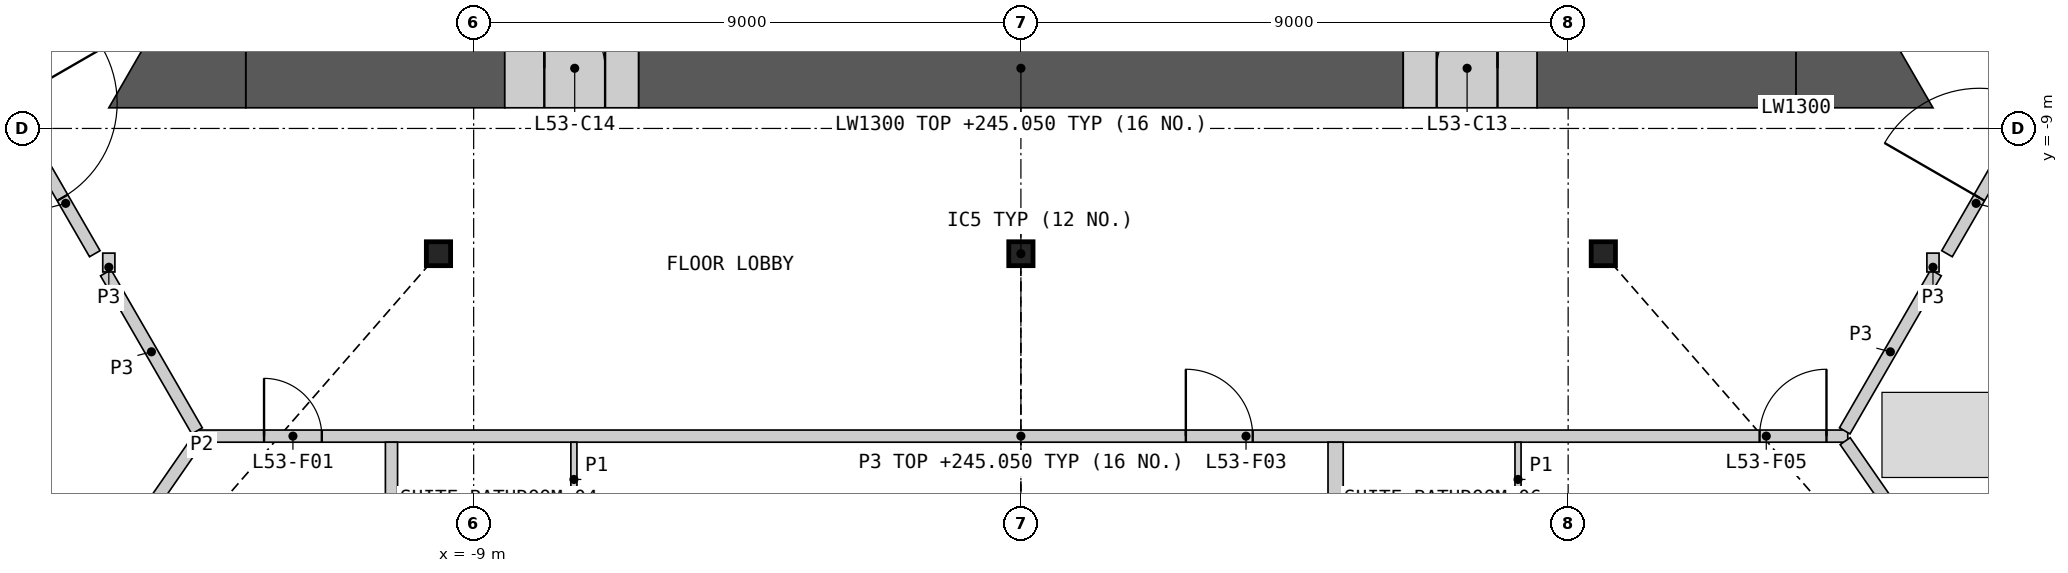
"""IFC4 building model, lengths in metres.
Left out: names, types, materials, properties, quantities, classifications, styles, units other than length and angle.
Written with IfcOpenShell. Run it as: python <this file> out.ifc"""

import sys

from ifc_helpers import new_model, si_unit, direction, frame, frame_2d, origin, origin_2d, place, context, subcontext, project, spatial, polyline, rectangle, i_section, outline, extrude, element, fill, save


model = new_model("IFC4")
c1 = context("Model", 3, precision=1e-05, world=origin(), true_north=direction((0.0, 1.0)))
c2 = subcontext(c1, "Body", "Model", "MODEL_VIEW")
j1 = project(units=[si_unit("LENGTHUNIT", "METRE"), si_unit("PLANEANGLEUNIT", "RADIAN")], contexts=[c1])
p1 = place(None, origin())
s1 = spatial("IfcSite", under=j1, at=p1, CompositionType="ELEMENT")
p2 = place(p1, origin())
s2 = spatial("IfcBuilding", under=s1, at=p2, CompositionType="ELEMENT")
p3 = place(p2, frame((0.0, 0.0, 241.8)))
s3 = spatial("IfcBuildingStorey", under=s2, at=p3, CompositionType="ELEMENT", Elevation=241.8)
for number, where, z_axis, x_axis in (
    (1, (-9.578, -11.06, 0.0), (0.0, 0.0, 1.0), (1.0, 0.0, 0.0)),
    (2, (0.0, -11.06, 0.0), (0.0, 0.0, 1.0), (1.0, 0.0, 0.0)),
    (3, (9.578, -11.06, 0.0), (0.0, 0.0, 1.0), (1.0, 0.0, 0.0)),
):
    element("IfcColumn", number, at=place(p3, frame(where, z_axis=z_axis, x_axis=x_axis)), inside=s3, PredefinedType="COLUMN", context=c2, shape_type="SweptSolid", body=[
        extrude(i_section(OverallWidth=0.399, OverallDepth=0.393, WebThickness=0.023, FlangeThickness=0.037, at=origin_2d()), origin(), (0.0, 0.0, 1.0), 3.6),
    ])
p4 = place(p3, frame((-6.288, -8.01, 0.0), z_axis=(0.0, 0.0, 1.0), x_axis=(1.0, 0.0, 0.0)))
e4 = element("IfcWall", 4, at=p4, inside=s3, PredefinedType="SHEAR", context=c2, shape_type="SweptSolid", body=[
    extrude(rectangle(XDim=12.576, YDim=1.3, at=frame_2d((6.288, 0.0))), origin(), (0.0, 0.0, 1.0), 3.25),
])
for number, where, z_axis, x_axis in (
    (5, (8.488, -8.01, 0.0), (0.0, 0.0, 1.0), (1.0, 0.0, 0.0)),
    (6, (-12.748, -8.01, 0.0), (0.0, 0.0, 1.0), (1.0, 0.0, 0.0)),
):
    element("IfcWall", number, at=place(p3, frame(where, z_axis=z_axis, x_axis=x_axis)), inside=s3, PredefinedType="SHEAR", context=c2, shape_type="SweptSolid", body=[
        extrude(rectangle(XDim=4.26, YDim=1.3, at=frame_2d((2.13, 0.0))), origin(), (0.0, 0.0, 1.0), 3.25),
    ])
p5 = place(p3, origin())
e7 = element("IfcWall", 7, at=p5, inside=s3, PredefinedType="SHEAR", context=c2, shape_type="SweptSolid", body=[
    extrude(outline(polyline([(12.748, -8.66), (12.748, -7.36), (13.874, -6.71), (15.0, -8.66), (12.748, -8.66)])), origin(), (0.0, 0.0, 1.0), 3.25),
])
p6 = place(p3, origin())
e8 = element("IfcWall", 8, at=p6, inside=s3, PredefinedType="SHEAR", context=c2, shape_type="SweptSolid", body=[
    extrude(outline(polyline([(-13.874, -6.71), (-12.748, -7.36), (-12.748, -8.66), (-15.0, -8.66), (-13.874, -6.71)])), origin(), (0.0, 0.0, 1.0), 3.25),
])
p7 = place(p3, frame((6.288, -8.01, 0.0), z_axis=(0.0, 0.0, 1.0), x_axis=(1.0, 0.0, 0.0)))
e9 = element("IfcWall", 9, at=p7, inside=s3, PredefinedType="SHEAR", context=c2, shape_type="SweptSolid", body=[
    extrude(rectangle(XDim=2.2, YDim=1.3, at=frame_2d((1.1, 0.0))), origin(), (0.0, 0.0, 1.0), 3.25),
])
p8 = place(p7, frame((0.55, 0.0, 0.0)))
e10 = element("IfcOpeningElement", 10, at=p8, cuts=e9, PredefinedType="OPENING", context=c2, shape_type="SweptSolid", body=[
    extrude(rectangle(XDim=1.0, YDim=2.1, at=frame_2d((0.5, 1.05))), frame((0.0, 0.66, 0.0), z_axis=(0.0, -1.0, 0.0), x_axis=(1.0, 0.0, 0.0)), (0.0, 0.0, 1.0), 1.32),
])
p9 = place(p3, frame((-8.488, -8.01, 0.0), z_axis=(0.0, 0.0, 1.0), x_axis=(1.0, 0.0, 0.0)))
e11 = element("IfcWall", 11, at=p9, inside=s3, PredefinedType="SHEAR", context=c2, shape_type="SweptSolid", body=[
    extrude(rectangle(XDim=2.2, YDim=1.3, at=frame_2d((1.1, 0.0))), origin(), (0.0, 0.0, 1.0), 3.25),
])
p10 = place(p9, frame((0.65, 0.0, 0.0)))
e12 = element("IfcOpeningElement", 12, at=p10, cuts=e11, PredefinedType="OPENING", context=c2, shape_type="SweptSolid", body=[
    extrude(rectangle(XDim=1.0, YDim=2.1, at=frame_2d((0.5, 1.05))), frame((0.0, 0.66, 0.0), z_axis=(0.0, -1.0, 0.0), x_axis=(1.0, 0.0, 0.0)), (0.0, 0.0, 1.0), 1.32),
])
p11 = place(p3, frame((-13.599, -14.06, 0.0), z_axis=(0.0, 0.0, 1.0), x_axis=(1.0, 0.0, 0.0)))
e13 = element("IfcWall", 13, at=p11, inside=s3, PredefinedType="PARTITIONING", context=c2, shape_type="SweptSolid", body=[
    extrude(rectangle(XDim=27.198, YDim=0.2, at=frame_2d((13.599, 0.0))), origin(), (0.0, 0.0, 1.0), 3.25),
])
p12 = place(p11, frame((1.152, 0.0, 0.0)))
e14 = element("IfcOpeningElement", 14, at=p12, cuts=e13, PredefinedType="OPENING", context=c2, shape_type="SweptSolid", body=[
    extrude(rectangle(XDim=0.95, YDim=2.1, at=frame_2d((0.475, 1.05))), frame((0.0, 0.11, 0.0), z_axis=(0.0, -1.0, 0.0), x_axis=(1.0, 0.0, 0.0)), (0.0, 0.0, 1.0), 0.22),
])
p13 = place(p11, frame((16.311, 0.0, 0.0)))
e15 = element("IfcOpeningElement", 15, at=p13, cuts=e13, PredefinedType="OPENING", context=c2, shape_type="SweptSolid", body=[
    extrude(rectangle(XDim=1.1, YDim=2.1, at=frame_2d((0.55, 1.05))), frame((0.0, 0.11, 0.0), z_axis=(0.0, -1.0, 0.0), x_axis=(1.0, 0.0, 0.0)), (0.0, 0.0, 1.0), 0.22),
])
p14 = place(p11, frame((25.747, 0.0, 0.0)))
e16 = element("IfcOpeningElement", 16, at=p14, cuts=e13, PredefinedType="OPENING", context=c2, shape_type="SweptSolid", body=[
    extrude(rectangle(XDim=1.1, YDim=2.1, at=frame_2d((0.55, 1.05))), frame((0.0, 0.11, 0.0), z_axis=(0.0, -1.0, 0.0), x_axis=(1.0, 0.0, 0.0)), (0.0, 0.0, 1.0), 0.22),
])
p15 = place(p3, frame((-17.244, -7.747, 0.0), z_axis=(0.0, 0.0, 1.0), x_axis=(0.500017753321, 0.866015153657, 0.0)))
e17 = element("IfcWall", 17, at=p15, inside=s3, PredefinedType="PARTITIONING", context=c2, shape_type="SweptSolid", body=[
    extrude(rectangle(XDim=5.51, YDim=0.2, at=frame_2d((2.755, 0.0))), origin(), (0.0, 0.0, 1.0), 3.25),
])
p16 = place(p15, frame((0.401, 0.0, 0.0)))
e18 = element("IfcOpeningElement", 18, at=p16, cuts=e17, PredefinedType="OPENING", context=c2, shape_type="SweptSolid", body=[
    extrude(rectangle(XDim=1.1, YDim=2.1, at=frame_2d((0.55, 1.05))), frame((0.0, 0.11, 0.0), z_axis=(0.0, -1.0, 0.0), x_axis=(1.0, 0.0, 0.0)), (0.0, 0.0, 1.0), 0.22),
])
p17 = place(p3, frame((14.489, -2.975, 0.0), z_axis=(0.0, 0.0, 1.0), x_axis=(0.500017753321, -0.866015153657, 0.0)))
e19 = element("IfcWall", 19, at=p17, inside=s3, PredefinedType="PARTITIONING", context=c2, shape_type="SweptSolid", body=[
    extrude(rectangle(XDim=5.51, YDim=0.2, at=frame_2d((2.755, 0.0))), origin(), (0.0, 0.0, 1.0), 3.25),
])
p18 = place(p17, frame((4.06, 0.0, 0.0)))
e20 = element("IfcOpeningElement", 20, at=p18, cuts=e19, PredefinedType="OPENING", context=c2, shape_type="SweptSolid", body=[
    extrude(rectangle(XDim=1.1, YDim=2.1, at=frame_2d((0.55, 1.05))), frame((0.0, 0.11, 0.0), z_axis=(0.0, -1.0, 0.0), x_axis=(1.0, 0.0, 0.0)), (0.0, 0.0, 1.0), 0.22),
])
p19 = place(p3, frame((5.176, -18.855, 0.0), z_axis=(0.0, 0.0, 1.0), x_axis=(0.0, 1.0, 0.0)))
e21 = element("IfcWall", 21, at=p19, inside=s3, PredefinedType="PARTITIONING", context=c2, shape_type="SweptSolid", body=[
    extrude(rectangle(XDim=4.695, YDim=0.25, at=frame_2d((2.348, 0.0))), origin(), (0.0, 0.0, 1.0), 2.404),
])
p20 = place(p3, frame((15.231, -11.06, 0.0), z_axis=(0.0, 0.0, 1.0), x_axis=(0.499961815444, 0.866047448526, 0.0)))
e22 = element("IfcWall", 22, at=p20, inside=s3, PredefinedType="PARTITIONING", context=c2, shape_type="SweptSolid", body=[
    extrude(rectangle(XDim=3.826, YDim=0.2, at=frame_2d((1.913, 0.0))), origin(), (0.0, 0.0, 1.0), 3.25),
])
p21 = place(p20, frame((1.064, 0.0, 0.0)))
e23 = element("IfcOpeningElement", 23, at=p21, cuts=e22, PredefinedType="OPENING", context=c2, shape_type="SweptSolid", body=[
    extrude(rectangle(XDim=1.8, YDim=2.1, at=frame_2d((0.9, 1.05))), frame((0.0, 0.11, 0.0), z_axis=(0.0, -1.0, 0.0), x_axis=(1.0, 0.0, 0.0)), (0.0, 0.0, 1.0), 0.22),
])
p22 = place(p3, frame((-17.144, -7.747, 0.0), z_axis=(0.0, 0.0, 1.0), x_axis=(0.499961815444, -0.866047448526, 0.0)))
e24 = element("IfcWall", 24, at=p22, inside=s3, PredefinedType="PARTITIONING", context=c2, shape_type="SweptSolid", body=[
    extrude(rectangle(XDim=3.826, YDim=0.2, at=frame_2d((1.913, 0.0))), origin(), (0.0, 0.0, 1.0), 3.25),
])
p23 = place(p22, frame((0.962, 0.0, 0.0)))
e25 = element("IfcOpeningElement", 25, at=p23, cuts=e24, PredefinedType="OPENING", context=c2, shape_type="SweptSolid", body=[
    extrude(rectangle(XDim=1.8, YDim=2.1, at=frame_2d((0.9, 1.05))), frame((0.0, 0.11, 0.0), z_axis=(0.0, -1.0, 0.0), x_axis=(1.0, 0.0, 0.0)), (0.0, 0.0, 1.0), 0.22),
])
for number, where, z_axis, x_axis in (
    (26, (13.549, -13.974, 0.0), (0.0, 0.0, 1.0), (0.5, 0.866, 0.0)),
    (27, (-15.05, -11.374, 0.0), (0.0, 0.0, 1.0), (0.5, -0.866, 0.0)),
):
    element("IfcWall", number, at=place(p3, frame(where, z_axis=z_axis, x_axis=x_axis)), inside=s3, PredefinedType="PARTITIONING", context=c2, shape_type="SweptSolid", body=[
        extrude(rectangle(XDim=3.002, YDim=0.2, at=frame_2d((1.501, 0.0))), origin(), (0.0, 0.0, 1.0), 3.25),
    ])
for number, where, z_axis, x_axis in (
    (28, (15.0, -11.36, 0.0), (0.0, 0.0, 1.0), (0.0, 1.0, 0.0)),
    (29, (-15.0, -11.36, 0.0), (0.0, 0.0, 1.0), (0.0, 1.0, 0.0)),
):
    element("IfcWall", number, at=place(p3, frame(where, z_axis=z_axis, x_axis=x_axis)), inside=s3, PredefinedType="PARTITIONING", context=c2, shape_type="SweptSolid", body=[
        extrude(rectangle(XDim=0.31, YDim=0.2, at=frame_2d((0.155, 0.0))), origin(), (0.0, 0.0, 1.0), 3.25),
    ])
p24 = place(p3, origin())
e30 = element("IfcWall", 30, at=p24, inside=s3, PredefinedType="PARTITIONING", context=c2, shape_type="SweptSolid", body=[
    extrude(outline(polyline([(-13.473, -14.199), (-19.794, -23.331), (-20.439, -23.912), (-13.638, -14.086), (-13.473, -14.199)])), origin(), (0.0, 0.0, 1.0), 2.404),
])
p25 = place(p3, frame((13.556, -14.143, 0.0), z_axis=(0.0, 0.0, 1.0), x_axis=(0.56913494803, -0.82224413098, 0.0)))
e31 = element("IfcWall", 31, at=p25, inside=s3, PredefinedType="PARTITIONING", context=c2, shape_type="SweptSolid", body=[
    extrude(rectangle(XDim=12.014, YDim=0.2, at=frame_2d((6.007, 0.0))), origin(), (0.0, 0.0, 1.0), 2.404),
])
p26 = place(p3, frame((-10.351, -23.527, 0.0), z_axis=(0.0, 0.0, 1.0), x_axis=(0.0, 1.0, 0.0)))
e32 = element("IfcWall", 32, at=p26, inside=s3, PredefinedType="PARTITIONING", context=c2, shape_type="SweptSolid", body=[
    extrude(rectangle(XDim=9.366, YDim=0.2, at=frame_2d((4.683, 0.0))), origin(), (0.0, 0.0, 1.0), 2.404),
])
p27 = place(p3, frame((-7.351, -16.61, 0.0), z_axis=(0.0, 0.0, 1.0), x_axis=(0.0, 1.0, 0.0)))
e33 = element("IfcWall", 33, at=p27, inside=s3, PredefinedType="PARTITIONING", context=c2, shape_type="SweptSolid", body=[
    extrude(rectangle(XDim=2.45, YDim=0.1, at=frame_2d((1.225, 0.0))), origin(), (0.0, 0.0, 1.0), 2.404),
])
p28 = place(p27, frame((0.25, 0.0, 0.0)))
e34 = element("IfcOpeningElement", 34, at=p28, cuts=e33, PredefinedType="OPENING", context=c2, shape_type="SweptSolid", body=[
    extrude(rectangle(XDim=0.95, YDim=2.1, at=frame_2d((0.475, 1.05))), frame((0.0, 0.06, 0.0), z_axis=(0.0, -1.0, 0.0), x_axis=(1.0, 0.0, 0.0)), (0.0, 0.0, 1.0), 0.12),
])
p29 = place(p3, frame((8.176, -16.61, 0.0), z_axis=(0.0, 0.0, 1.0), x_axis=(0.0, 1.0, 0.0)))
e35 = element("IfcWall", 35, at=p29, inside=s3, PredefinedType="PARTITIONING", context=c2, shape_type="SweptSolid", body=[
    extrude(rectangle(XDim=2.45, YDim=0.1, at=frame_2d((1.225, 0.0))), origin(), (0.0, 0.0, 1.0), 2.404),
])
p30 = place(p29, frame((0.25, 0.0, 0.0)))
e36 = element("IfcOpeningElement", 36, at=p30, cuts=e35, PredefinedType="OPENING", context=c2, shape_type="SweptSolid", body=[
    extrude(rectangle(XDim=0.95, YDim=2.1, at=frame_2d((0.475, 1.05))), frame((0.0, 0.06, 0.0), z_axis=(0.0, -1.0, 0.0), x_axis=(1.0, 0.0, 0.0)), (0.0, 0.0, 1.0), 0.12),
])
p31 = place(p12, origin())
e37 = element("IfcDoor", 37, at=p31, inside=s3, OperationType="SINGLE_SWING_LEFT", PredefinedType="DOOR", context=c2, shape_type="SweptSolid", body=[
    extrude(rectangle(XDim=0.95, YDim=2.1, at=frame_2d((0.475, 1.05))), frame((0.0, 0.025, 0.0), z_axis=(0.0, -1.0, 0.0), x_axis=(1.0, 0.0, 0.0)), (0.0, 0.0, 1.0), 0.05),
])
fill(e14, e37)
p32 = place(p13, origin())
e38 = element("IfcDoor", 38, at=p32, inside=s3, OperationType="SINGLE_SWING_LEFT", PredefinedType="DOOR", context=c2, shape_type="SweptSolid", body=[
    extrude(rectangle(XDim=1.1, YDim=2.1, at=frame_2d((0.55, 1.05))), frame((0.0, 0.025, 0.0), z_axis=(0.0, -1.0, 0.0), x_axis=(1.0, 0.0, 0.0)), (0.0, 0.0, 1.0), 0.05),
])
fill(e15, e38)
p33 = place(p14, origin())
e39 = element("IfcDoor", 39, at=p33, inside=s3, OperationType="SINGLE_SWING_RIGHT", PredefinedType="DOOR", context=c2, shape_type="SweptSolid", body=[
    extrude(rectangle(XDim=1.1, YDim=2.1, at=frame_2d((0.55, 1.05))), frame((0.0, 0.025, 0.0), z_axis=(0.0, -1.0, 0.0), x_axis=(1.0, 0.0, 0.0)), (0.0, 0.0, 1.0), 0.05),
])
fill(e16, e39)
p34 = place(p21, origin())
e40 = element("IfcDoor", 40, at=p34, inside=s3, OperationType="DOUBLE_DOOR_SINGLE_SWING", PredefinedType="DOOR", context=c2, shape_type="SweptSolid", body=[
    extrude(rectangle(XDim=1.8, YDim=2.1, at=frame_2d((0.9, 1.05))), frame((0.0, 0.025, 0.0), z_axis=(0.0, -1.0, 0.0), x_axis=(1.0, 0.0, 0.0)), (0.0, 0.0, 1.0), 0.05),
])
fill(e23, e40)
p35 = place(p23, origin())
e41 = element("IfcDoor", 41, at=p35, inside=s3, OperationType="DOUBLE_DOOR_SINGLE_SWING", PredefinedType="DOOR", context=c2, shape_type="SweptSolid", body=[
    extrude(rectangle(XDim=1.8, YDim=2.1, at=frame_2d((0.9, 1.05))), frame((0.0, 0.025, 0.0), z_axis=(0.0, -1.0, 0.0), x_axis=(1.0, 0.0, 0.0)), (0.0, 0.0, 1.0), 0.05),
])
fill(e25, e41)
save(model, sys.argv[1])
